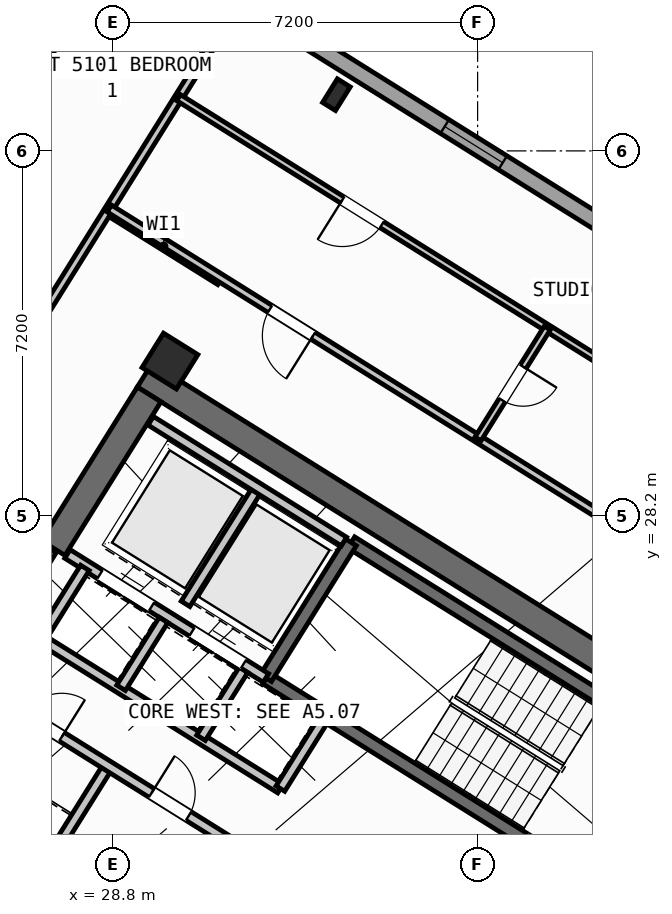
"""IFC4 building model, lengths in metres.
Left out: names, types, materials, properties, quantities, classifications, styles, units other than length and angle.
Written with IfcOpenShell. Run it as: python <this file> out.ifc"""

import sys

from ifc_helpers import new_model, si_unit, direction, frame, frame_2d, origin, origin_2d, place, context, subcontext, project, spatial, rectangle, hollow_rectangle, i_section, extrude, source, transform, mapped, element, fill, save


model = new_model("IFC4")
c1 = context("Model", 3, precision=1e-05, world=origin(), true_north=direction((0.0, 1.0)))
c2 = subcontext(c1, "Body", "Model", "MODEL_VIEW")
j1 = project(units=[si_unit("LENGTHUNIT", "METRE"), si_unit("PLANEANGLEUNIT", "RADIAN")], contexts=[c1])
p1 = place(None, origin())
s1 = spatial("IfcSite", under=j1, at=p1, CompositionType="ELEMENT")
p2 = place(p1, origin())
s2 = spatial("IfcBuilding", under=s1, at=p2, CompositionType="ELEMENT")
p3 = place(p2, frame((0.0, 0.0, 204.0)))
s3 = spatial("IfcBuildingStorey", under=s2, at=p3, CompositionType="ELEMENT", Elevation=204.0)
p4 = place(p3, frame((40.573, 24.01, 0.0), z_axis=(0.0, 0.0, 1.0), x_axis=(-0.848047359947, 0.529920442413, 0.0)))
e1 = element("IfcWall", 1, at=p4, inside=s3, PredefinedType="SHEAR", context=c2, shape_type="SweptSolid", body=[
    extrude(rectangle(XDim=13.14, YDim=0.55, at=frame_2d((6.57, 0.0))), origin(), (0.0, 0.0, 1.0), 3.35),
])
p5 = place(p3, frame((40.194, 23.922, 0.0), z_axis=(0.0, 0.0, 1.0), x_axis=(-0.529888438328, -0.848067357541, 0.0)))
e2 = element("IfcWall", 2, at=p5, inside=s3, PredefinedType="SHEAR", context=c2, shape_type="SweptSolid", body=[
    extrude(rectangle(XDim=3.575, YDim=0.55, at=frame_2d((1.788, 0.0))), origin(), (0.0, 0.0, 1.0), 3.35),
])
p6 = place(p3, frame((29.517, 30.594, 0.0), z_axis=(0.0, 0.0, 1.0), x_axis=(-0.529906864564, -0.848055844204, 0.0)))
e3 = element("IfcWall", 3, at=p6, inside=s3, PredefinedType="SHEAR", context=c2, shape_type="SweptSolid", body=[
    extrude(rectangle(XDim=3.575, YDim=0.55, at=frame_2d((1.788, 0.0))), origin(), (0.0, 0.0, 1.0), 3.35),
])
m1 = source(origin(), c2, "Body", "SweptSolid", [
    extrude(i_section(OverallWidth=0.3, OverallDepth=0.55, WebThickness=0.015, FlangeThickness=0.029, at=origin_2d()), origin(), (0.0, 0.0, 1.0), 3.6),
])
p7 = place(p3, frame((33.213, 36.509, 0.0), z_axis=(0.0, 0.0, 1.0), x_axis=(-0.848048096156, 0.529919264233, 0.0)))
e4 = element("IfcColumn", 4, at=p7, inside=s3, PredefinedType="COLUMN", context=c2, shape_type="MappedRepresentation", body=[
    mapped(m1, transform((0.0, 0.0, 0.0), scale=1.0)),
])
m2 = source(origin(), c2, "Body", "SweptSolid", [
    extrude(hollow_rectangle(XDim=0.8, YDim=0.8, WallThickness=0.032, at=origin_2d()), origin(), (0.0, 0.0, 1.0), 3.6),
])
p8 = place(p3, frame((29.928, 31.251, 0.0), z_axis=(0.0, 0.0, 1.0), x_axis=(-0.848048096156, 0.529919264233, 0.0)))
e5 = element("IfcColumn", 5, at=p8, inside=s3, PredefinedType="COLUMN", context=c2, shape_type="MappedRepresentation", body=[
    mapped(m2, transform((0.0, 0.0, 0.0), scale=1.0)),
])
p9 = place(p3, frame((31.76, 12.183, 0.0), z_axis=(0.0, 0.0, 1.0), x_axis=(-0.848047074256, 0.529920899612, 0.0)))
e6 = element("IfcWall", 6, at=p9, inside=s3, PredefinedType="STANDARD", context=c2, shape_type="SweptSolid", body=[
    extrude(rectangle(XDim=30.652, YDim=0.32, at=frame_2d((15.326, 0.0))), origin(), (0.0, 0.0, 1.0), 3.35),
])
p10 = place(p9, frame((15.166, 0.0, 0.0)))
e7 = element("IfcOpeningElement", 7, at=p10, cuts=e6, PredefinedType="OPENING", context=c2, shape_type="SweptSolid", body=[
    extrude(rectangle(XDim=1.2, YDim=2.15, at=frame_2d((0.6, 1.075))), frame((0.0, 0.17, 0.0), z_axis=(0.0, -1.0, 0.0), x_axis=(1.0, 0.0, 0.0)), (0.0, 0.0, 1.0), 0.34),
])
p11 = place(p9, frame((2.24, 0.0, 0.9)))
e8 = element("IfcOpeningElement", 8, at=p11, cuts=e6, PredefinedType="OPENING", context=c2, shape_type="SweptSolid", body=[
    extrude(rectangle(XDim=1.65, YDim=1.45, at=frame_2d((0.825, 0.725))), frame((0.0, 0.17, 0.0), z_axis=(0.0, -1.0, 0.0), x_axis=(1.0, 0.0, 0.0)), (0.0, 0.0, 1.0), 0.34),
])
p12 = place(p9, frame((7.469, 0.0, 0.9)))
e9 = element("IfcOpeningElement", 9, at=p12, cuts=e6, PredefinedType="OPENING", context=c2, shape_type="SweptSolid", body=[
    extrude(rectangle(XDim=1.65, YDim=1.45, at=frame_2d((0.825, 0.725))), frame((0.0, 0.17, 0.0), z_axis=(0.0, -1.0, 0.0), x_axis=(1.0, 0.0, 0.0)), (0.0, 0.0, 1.0), 0.34),
])
p13 = place(p9, frame((12.623, 0.0, 1.0)))
e10 = element("IfcOpeningElement", 10, at=p13, cuts=e6, PredefinedType="OPENING", context=c2, shape_type="SweptSolid", body=[
    extrude(rectangle(XDim=0.9, YDim=1.25, at=frame_2d((0.45, 0.625))), frame((0.0, 0.17, 0.0), z_axis=(0.0, -1.0, 0.0), x_axis=(1.0, 0.0, 0.0)), (0.0, 0.0, 1.0), 0.34),
])
p14 = place(p9, frame((19.556, 0.0, 1.0)))
e11 = element("IfcOpeningElement", 11, at=p14, cuts=e6, PredefinedType="OPENING", context=c2, shape_type="SweptSolid", body=[
    extrude(rectangle(XDim=0.9, YDim=1.25, at=frame_2d((0.45, 0.625))), frame((0.0, 0.17, 0.0), z_axis=(0.0, -1.0, 0.0), x_axis=(1.0, 0.0, 0.0)), (0.0, 0.0, 1.0), 0.34),
])
p15 = place(p9, frame((21.95, 0.0, 1.0)))
e12 = element("IfcOpeningElement", 12, at=p15, cuts=e6, PredefinedType="OPENING", context=c2, shape_type="SweptSolid", body=[
    extrude(rectangle(XDim=0.9, YDim=1.25, at=frame_2d((0.45, 0.625))), frame((0.0, 0.17, 0.0), z_axis=(0.0, -1.0, 0.0), x_axis=(1.0, 0.0, 0.0)), (0.0, 0.0, 1.0), 0.34),
])
p16 = place(p9, frame((26.983, 0.0, 0.9)))
e13 = element("IfcOpeningElement", 13, at=p16, cuts=e6, PredefinedType="OPENING", context=c2, shape_type="SweptSolid", body=[
    extrude(rectangle(XDim=1.35, YDim=1.45, at=frame_2d((0.675, 0.725))), frame((0.0, 0.17, 0.0), z_axis=(0.0, -1.0, 0.0), x_axis=(1.0, 0.0, 0.0)), (0.0, 0.0, 1.0), 0.34),
])
p17 = place(p3, frame((17.424, 47.083, 0.0), z_axis=(0.0, 0.0, 1.0), x_axis=(0.848049927979, -0.529916332693, 0.0)))
e14 = element("IfcWall", 14, at=p17, inside=s3, PredefinedType="STANDARD", context=c2, shape_type="SweptSolid", body=[
    extrude(rectangle(XDim=29.223, YDim=0.32, at=frame_2d((14.612, 0.0))), origin(), (0.0, 0.0, 1.0), 3.35),
])
p18 = place(p17, frame((8.799, 0.0, 0.0)))
e15 = element("IfcOpeningElement", 15, at=p18, cuts=e14, PredefinedType="OPENING", context=c2, shape_type="SweptSolid", body=[
    extrude(rectangle(XDim=1.05, YDim=2.15, at=frame_2d((0.525, 1.075))), frame((0.0, 0.17, 0.0), z_axis=(0.0, -1.0, 0.0), x_axis=(1.0, 0.0, 0.0)), (0.0, 0.0, 1.0), 0.34),
])
p19 = place(p17, frame((0.794, 0.0, 0.9)))
e16 = element("IfcOpeningElement", 16, at=p19, cuts=e14, PredefinedType="OPENING", context=c2, shape_type="SweptSolid", body=[
    extrude(rectangle(XDim=1.65, YDim=1.45, at=frame_2d((0.825, 0.725))), frame((0.0, 0.17, 0.0), z_axis=(0.0, -1.0, 0.0), x_axis=(1.0, 0.0, 0.0)), (0.0, 0.0, 1.0), 0.34),
])
p20 = place(p17, frame((4.056, 0.0, 0.9)))
e17 = element("IfcOpeningElement", 17, at=p20, cuts=e14, PredefinedType="OPENING", context=c2, shape_type="SweptSolid", body=[
    extrude(rectangle(XDim=1.35, YDim=1.45, at=frame_2d((0.675, 0.725))), frame((0.0, 0.17, 0.0), z_axis=(0.0, -1.0, 0.0), x_axis=(1.0, 0.0, 0.0)), (0.0, 0.0, 1.0), 0.34),
])
p21 = place(p17, frame((7.151, 0.0, 1.0)))
e18 = element("IfcOpeningElement", 18, at=p21, cuts=e14, PredefinedType="OPENING", context=c2, shape_type="SweptSolid", body=[
    extrude(rectangle(XDim=0.9, YDim=1.25, at=frame_2d((0.45, 0.625))), frame((0.0, 0.17, 0.0), z_axis=(0.0, -1.0, 0.0), x_axis=(1.0, 0.0, 0.0)), (0.0, 0.0, 1.0), 0.34),
])
p22 = place(p17, frame((14.612, 0.0, 1.0)))
e19 = element("IfcOpeningElement", 19, at=p22, cuts=e14, PredefinedType="OPENING", context=c2, shape_type="SweptSolid", body=[
    extrude(rectangle(XDim=0.9, YDim=1.25, at=frame_2d((0.45, 0.625))), frame((0.0, 0.17, 0.0), z_axis=(0.0, -1.0, 0.0), x_axis=(1.0, 0.0, 0.0)), (0.0, 0.0, 1.0), 0.34),
])
p23 = place(p17, frame((17.254, 0.0, 1.0)))
e20 = element("IfcOpeningElement", 20, at=p23, cuts=e14, PredefinedType="OPENING", context=c2, shape_type="SweptSolid", body=[
    extrude(rectangle(XDim=0.9, YDim=1.25, at=frame_2d((0.45, 0.625))), frame((0.0, 0.17, 0.0), z_axis=(0.0, -1.0, 0.0), x_axis=(1.0, 0.0, 0.0)), (0.0, 0.0, 1.0), 0.34),
])
p24 = place(p17, frame((21.139, 0.0, 0.9)))
e21 = element("IfcOpeningElement", 21, at=p24, cuts=e14, PredefinedType="OPENING", context=c2, shape_type="SweptSolid", body=[
    extrude(rectangle(XDim=1.35, YDim=1.45, at=frame_2d((0.675, 0.725))), frame((0.0, 0.17, 0.0), z_axis=(0.0, -1.0, 0.0), x_axis=(1.0, 0.0, 0.0)), (0.0, 0.0, 1.0), 0.34),
])
p25 = place(p17, frame((25.778, 0.0, 0.9)))
e22 = element("IfcOpeningElement", 22, at=p25, cuts=e14, PredefinedType="OPENING", context=c2, shape_type="SweptSolid", body=[
    extrude(rectangle(XDim=1.35, YDim=1.45, at=frame_2d((0.675, 0.725))), frame((0.0, 0.17, 0.0), z_axis=(0.0, -1.0, 0.0), x_axis=(1.0, 0.0, 0.0)), (0.0, 0.0, 1.0), 0.34),
])
p26 = place(p3, frame((31.28, 18.261, 0.0), z_axis=(0.0, 0.0, 1.0), x_axis=(-0.848051618787, 0.529913626805, 0.0)))
e23 = element("IfcWall", 23, at=p26, inside=s3, PredefinedType="SHEAR", context=c2, shape_type="SweptSolid", body=[
    extrude(rectangle(XDim=7.46, YDim=0.26, at=frame_2d((3.73, 0.0))), origin(), (0.0, 0.0, 1.0), 3.35),
])
p27 = place(p26, frame((0.36, 0.0, 0.0)))
e24 = element("IfcOpeningElement", 24, at=p27, cuts=e23, PredefinedType="OPENING", context=c2, shape_type="SweptSolid", body=[
    extrude(rectangle(XDim=0.86, YDim=2.05, at=frame_2d((0.43, 1.025))), frame((0.0, 0.14, 0.0), z_axis=(0.0, -1.0, 0.0), x_axis=(1.0, 0.0, 0.0)), (0.0, 0.0, 1.0), 0.28),
])
p28 = place(p3, frame((39.721, 23.788, 0.0), z_axis=(0.0, 0.0, 1.0), x_axis=(-0.848054434086, 0.529909121291, 0.0)))
e25 = element("IfcWall", 25, at=p28, inside=s3, PredefinedType="SHEAR", context=c2, shape_type="SweptSolid", body=[
    extrude(rectangle(XDim=7.33, YDim=0.26, at=frame_2d((3.665, 0.0))), origin(), (0.0, 0.0, 1.0), 3.35),
])
p29 = place(p3, frame((38.046, 21.108, 0.0), z_axis=(0.0, 0.0, 1.0), x_axis=(-0.848054434086, 0.529909121291, 0.0)))
e26 = element("IfcWall", 26, at=p29, inside=s3, PredefinedType="SHEAR", context=c2, shape_type="SweptSolid", body=[
    extrude(rectangle(XDim=7.33, YDim=0.26, at=frame_2d((3.665, 0.0))), origin(), (0.0, 0.0, 1.0), 3.35),
])
p30 = place(p29, frame((0.22, 0.0, 0.0)))
e27 = element("IfcOpeningElement", 27, at=p30, cuts=e26, PredefinedType="OPENING", context=c2, shape_type="SweptSolid", body=[
    extrude(rectangle(XDim=1.1, YDim=2.1, at=frame_2d((0.55, 1.05))), frame((0.0, 0.14, 0.0), z_axis=(0.0, -1.0, 0.0), x_axis=(1.0, 0.0, 0.0)), (0.0, 0.0, 1.0), 0.28),
])
p31 = place(p3, frame((33.496, 27.677, 0.0), z_axis=(0.0, 0.0, 1.0), x_axis=(-0.529908658664, -0.84805472316, 0.0)))
e28 = element("IfcWall", 28, at=p31, inside=s3, PredefinedType="SHEAR", context=c2, shape_type="SweptSolid", body=[
    extrude(rectangle(XDim=3.16, YDim=0.26, at=frame_2d((1.58, 0.0))), origin(), (0.0, 0.0, 1.0), 3.35),
])
p32 = place(p3, frame((31.822, 24.998, 0.0), z_axis=(0.0, 0.0, 1.0), x_axis=(-0.848036912365, 0.52993716162, 0.0)))
e29 = element("IfcWall", 29, at=p32, inside=s3, PredefinedType="STANDARD", context=c2, shape_type="SweptSolid", body=[
    extrude(rectangle(XDim=4.618, YDim=0.2, at=frame_2d((2.309, 0.0))), origin(), (0.0, 0.0, 1.0), 3.34),
])
p33 = place(p32, frame((0.52, 0.0, 0.0)))
e30 = element("IfcOpeningElement", 30, at=p33, cuts=e29, PredefinedType="OPENING", context=c2, shape_type="SweptSolid", body=[
    extrude(rectangle(XDim=1.2, YDim=2.15, at=frame_2d((0.6, 1.075))), frame((0.0, 0.11, 0.0), z_axis=(0.0, -1.0, 0.0), x_axis=(1.0, 0.0, 0.0)), (0.0, 0.0, 1.0), 0.22),
])
p34 = place(p32, frame((2.66, 0.0, 0.0)))
e31 = element("IfcOpeningElement", 31, at=p34, cuts=e29, PredefinedType="OPENING", context=c2, shape_type="SweptSolid", body=[
    extrude(rectangle(XDim=1.2, YDim=2.15, at=frame_2d((0.6, 1.075))), frame((0.0, 0.11, 0.0), z_axis=(0.0, -1.0, 0.0), x_axis=(1.0, 0.0, 0.0)), (0.0, 0.0, 1.0), 0.22),
])
p35 = place(p3, frame((32.108, 22.814, 0.0), z_axis=(0.0, 0.0, 1.0), x_axis=(-0.848042229521, 0.529928652696, 0.0)))
e32 = element("IfcWall", 32, at=p35, inside=s3, PredefinedType="STANDARD", context=c2, shape_type="SweptSolid", body=[
    extrude(rectangle(XDim=5.62, YDim=0.2, at=frame_2d((2.81, 0.0))), origin(), (0.0, 0.0, 1.0), 3.34),
])
p36 = place(p3, frame((32.982, 24.213, 0.0), z_axis=(0.0, 0.0, 1.0), x_axis=(-0.529839334948, -0.84809803628, 0.0)))
e33 = element("IfcWall", 33, at=p36, inside=s3, PredefinedType="STANDARD", context=c2, shape_type="SweptSolid", body=[
    extrude(rectangle(XDim=1.65, YDim=0.2, at=frame_2d((0.825, 0.0))), origin(), (0.0, 0.0, 1.0), 3.34),
])
p37 = place(p3, frame((28.25, 27.17, 0.0), z_axis=(0.0, 0.0, 1.0), x_axis=(-0.529905827651, -0.848056492117, 0.0)))
e34 = element("IfcWall", 34, at=p37, inside=s3, PredefinedType="STANDARD", context=c2, shape_type="SweptSolid", body=[
    extrude(rectangle(XDim=1.65, YDim=0.2, at=frame_2d((0.825, 0.0))), origin(), (0.0, 0.0, 1.0), 3.34),
])
p38 = place(p3, frame((31.645, 28.716, 0.0), z_axis=(0.0, 0.0, 1.0), x_axis=(-0.52986693015, -0.848080795876, 0.0)))
e35 = element("IfcWall", 35, at=p38, inside=s3, PredefinedType="STANDARD", context=c2, shape_type="SweptSolid", body=[
    extrude(rectangle(XDim=2.66, YDim=0.2, at=frame_2d((1.33, 0.0))), origin(), (0.0, 0.0, 1.0), 3.34),
])
p39 = place(p3, frame((33.363, 27.69, 0.0), z_axis=(0.0, 0.0, 1.0), x_axis=(-0.848047090064, 0.529920874315, 0.0)))
e36 = element("IfcWall", 36, at=p39, inside=s3, PredefinedType="STANDARD", context=c2, shape_type="SweptSolid", body=[
    extrude(rectangle(XDim=4.498, YDim=0.2, at=frame_2d((2.249, 0.0))), origin(), (0.0, 0.0, 1.0), 3.34),
])
for number, where, z_axis, x_axis in (
    (37, (31.379, 25.156, 0.0), (0.0, 0.0, 1.0), (-0.53, -0.848, 0.0)),
    (38, (29.801, 26.142, 0.0), (0.0, 0.0, 1.0), (-0.53, -0.848, 0.0)),
):
    element("IfcWall", number, at=place(p3, frame(where, z_axis=z_axis, x_axis=x_axis)), inside=s3, PredefinedType="STANDARD", context=c2, shape_type="SweptSolid", body=[
        extrude(rectangle(XDim=1.58, YDim=0.2, at=frame_2d((0.79, 0.0))), origin(), (0.0, 0.0, 1.0), 3.34),
    ])
p40 = place(p3, frame((28.71, 23.263, 0.0), z_axis=(0.0, 0.0, 1.0), x_axis=(-0.529907497854, -0.848055448493, 0.0)))
e39 = element("IfcWall", 39, at=p40, inside=s3, PredefinedType="STANDARD", context=c2, shape_type="SweptSolid", body=[
    extrude(rectangle(XDim=2.88, YDim=0.2, at=frame_2d((1.44, 0.0))), origin(), (0.0, 0.0, 1.0), 3.34),
])
p41 = place(p3, frame((31.525, 21.504, 0.0), z_axis=(0.0, 0.0, 1.0), x_axis=(-0.848040211232, 0.529931882541, 0.0)))
e40 = element("IfcWall", 40, at=p41, inside=s3, PredefinedType="STANDARD", context=c2, shape_type="SweptSolid", body=[
    extrude(rectangle(XDim=6.218, YDim=0.2, at=frame_2d((3.109, 0.0))), origin(), (0.0, 0.0, 1.0), 3.34),
])
p42 = place(p41, frame((4.4, 0.0, 0.0)))
e41 = element("IfcOpeningElement", 41, at=p42, cuts=e40, PredefinedType="OPENING", context=c2, shape_type="SweptSolid", body=[
    extrude(rectangle(XDim=0.86, YDim=2.05, at=frame_2d((0.43, 1.025))), frame((0.0, 0.11, 0.0), z_axis=(0.0, -1.0, 0.0), x_axis=(1.0, 0.0, 0.0)), (0.0, 0.0, 1.0), 0.22),
])
p43 = place(p41, frame((1.45, 0.0, 0.0)))
e42 = element("IfcOpeningElement", 42, at=p43, cuts=e40, PredefinedType="OPENING", context=c2, shape_type="SweptSolid", body=[
    extrude(rectangle(XDim=0.86, YDim=2.05, at=frame_2d((0.43, 1.025))), frame((0.0, 0.11, 0.0), z_axis=(0.0, -1.0, 0.0), x_axis=(1.0, 0.0, 0.0)), (0.0, 0.0, 1.0), 0.22),
])
p44 = place(p3, frame((27.596, 27.52, 0.0), z_axis=(0.0, 0.0, 1.0), x_axis=(-0.529865479138, -0.848081702443, 0.0)))
e43 = element("IfcWall", 43, at=p44, inside=s3, PredefinedType="STANDARD", context=c2, shape_type="SweptSolid", body=[
    extrude(rectangle(XDim=2.96, YDim=0.2, at=frame_2d((1.48, 0.0))), origin(), (0.0, 0.0, 1.0), 3.34),
])
p45 = place(p44, frame((1.76, 0.0, 0.0)))
e44 = element("IfcOpeningElement", 44, at=p45, cuts=e43, PredefinedType="OPENING", context=c2, shape_type="SweptSolid", body=[
    extrude(rectangle(XDim=0.86, YDim=2.05, at=frame_2d((0.43, 1.025))), frame((0.0, 0.11, 0.0), z_axis=(0.0, -1.0, 0.0), x_axis=(1.0, 0.0, 0.0)), (0.0, 0.0, 1.0), 0.22),
])
p46 = place(p3, frame((30.914, 32.829, 0.0), z_axis=(0.0, 0.0, 1.0), x_axis=(-0.848008813643, 0.529982124211, 0.0)))
e45 = element("IfcWall", 45, at=p46, inside=s3, PredefinedType="PARTITIONING", context=c2, shape_type="SweptSolid", body=[
    extrude(rectangle(XDim=2.61, YDim=0.16, at=frame_2d((1.305, 0.0))), origin(), (0.0, 0.0, 1.0), 3.34),
])
p47 = place(p3, frame((31.239, 38.274, 0.0), z_axis=(0.0, 0.0, 1.0), x_axis=(-0.529918119251, -0.84804881162, 0.0)))
e46 = element("IfcWall", 46, at=p47, inside=s3, PredefinedType="PARTITIONING", context=c2, shape_type="SweptSolid", body=[
    extrude(rectangle(XDim=17.65, YDim=0.16, at=frame_2d((8.825, 0.0))), origin(), (0.0, 0.0, 1.0), 3.34),
])
p48 = place(p3, frame((29.161, 39.89, 0.0), z_axis=(0.0, 0.0, 1.0), x_axis=(-0.529915512424, -0.848050440535, 0.0)))
e47 = element("IfcWall", 47, at=p48, inside=s3, PredefinedType="PARTITIONING", context=c2, shape_type="SweptSolid", body=[
    extrude(rectangle(XDim=15.52, YDim=0.11, at=frame_2d((7.76, 0.0))), origin(), (0.0, 0.0, 1.0), 3.34),
])
p49 = place(p48, frame((7.345, 0.0, 0.0)))
e48 = element("IfcOpeningElement", 48, at=p49, cuts=e47, PredefinedType="OPENING", context=c2, shape_type="SweptSolid", body=[
    extrude(rectangle(XDim=0.92, YDim=2.08, at=frame_2d((0.46, 1.04))), frame((0.0, 0.065, 0.0), z_axis=(0.0, -1.0, 0.0), x_axis=(1.0, 0.0, 0.0)), (0.0, 0.0, 1.0), 0.13),
])
p50 = place(p3, frame((41.936, 26.012, 0.0), z_axis=(0.0, 0.0, 1.0), x_axis=(-0.848051154596, 0.529914369676, 0.0)))
e49 = element("IfcWall", 49, at=p50, inside=s3, PredefinedType="PARTITIONING", context=c2, shape_type="SweptSolid", body=[
    extrude(rectangle(XDim=15.57, YDim=0.16, at=frame_2d((7.785, 0.0))), origin(), (0.0, 0.0, 1.0), 3.34),
])
p51 = place(p50, frame((10.83, 0.0, 0.0)))
e50 = element("IfcOpeningElement", 50, at=p51, cuts=e49, PredefinedType="OPENING", context=c2, shape_type="SweptSolid", body=[
    extrude(rectangle(XDim=1.0, YDim=2.1, at=frame_2d((0.5, 1.05))), frame((0.0, 0.09, 0.0), z_axis=(0.0, -1.0, 0.0), x_axis=(1.0, 0.0, 0.0)), (0.0, 0.0, 1.0), 0.18),
])
p52 = place(p3, frame((42.226, 28.873, 0.0), z_axis=(0.0, 0.0, 1.0), x_axis=(-0.848049134363, 0.529917602752, 0.0)))
e51 = element("IfcWall", 51, at=p52, inside=s3, PredefinedType="PLUMBINGWALL", context=c2, shape_type="SweptSolid", body=[
    extrude(rectangle(XDim=14.3, YDim=0.14, at=frame_2d((7.15, 0.0))), origin(), (0.0, 0.0, 1.0), 3.34),
])
p53 = place(p52, frame((9.57, 0.0, 0.0)))
e52 = element("IfcOpeningElement", 52, at=p53, cuts=e51, PredefinedType="OPENING", context=c2, shape_type="SweptSolid", body=[
    extrude(rectangle(XDim=0.92, YDim=2.08, at=frame_2d((0.46, 1.04))), frame((0.0, 0.08, 0.0), z_axis=(0.0, -1.0, 0.0), x_axis=(1.0, 0.0, 0.0)), (0.0, 0.0, 1.0), 0.16),
])
p54 = place(p3, frame((37.375, 31.904, 0.0), z_axis=(0.0, 0.0, 1.0), x_axis=(-0.529913878929, -0.848051461244, 0.0)))
e53 = element("IfcWall", 53, at=p54, inside=s3, PredefinedType="PLUMBINGWALL", context=c2, shape_type="SweptSolid", body=[
    extrude(rectangle(XDim=2.58, YDim=0.14, at=frame_2d((1.29, 0.0))), origin(), (0.0, 0.0, 1.0), 3.34),
])
p55 = place(p54, frame((0.9, 0.0, 0.0)))
e54 = element("IfcOpeningElement", 54, at=p55, cuts=e53, PredefinedType="OPENING", context=c2, shape_type="SweptSolid", body=[
    extrude(rectangle(XDim=0.78, YDim=2.05, at=frame_2d((0.39, 1.025))), frame((0.0, 0.08, 0.0), z_axis=(0.0, -1.0, 0.0), x_axis=(1.0, 0.0, 0.0)), (0.0, 0.0, 1.0), 0.16),
])
m3 = source(origin(), c2, "Body", "SweptSolid", [
    extrude(rectangle(XDim=1.35, YDim=1.45, at=frame_2d((0.675, 0.725))), frame((0.0, 0.03, 0.0), z_axis=(0.0, -1.0, 0.0), x_axis=(1.0, 0.0, 0.0)), (0.0, 0.0, 1.0), 0.06),
])
p56 = place(p24, origin())
e55 = element("IfcWindow", 55, at=p56, inside=s3, PartitioningType="SINGLE_PANEL", PredefinedType="WINDOW", context=c2, shape_type="MappedRepresentation", body=[
    mapped(m3, transform((0.0, 0.0, 0.0), scale=1.0)),
])
fill(e21, e55)
m4 = source(origin(), c2, "Body", "SweptSolid", [
    extrude(rectangle(XDim=1.2, YDim=2.15, at=frame_2d((0.6, 1.075))), frame((0.0, 0.025, 0.0), z_axis=(0.0, -1.0, 0.0), x_axis=(1.0, 0.0, 0.0)), (0.0, 0.0, 1.0), 0.05),
])
p57 = place(p33, origin())
e56 = element("IfcDoor", 56, at=p57, inside=s3, OperationType="DOUBLE_DOOR_SLIDING", PredefinedType="DOOR", context=c2, shape_type="MappedRepresentation", body=[
    mapped(m4, transform((0.0, 0.0, 0.0), scale=1.0)),
])
fill(e30, e56)
p58 = place(p34, origin())
e57 = element("IfcDoor", 57, at=p58, inside=s3, OperationType="DOUBLE_DOOR_SLIDING", PredefinedType="DOOR", context=c2, shape_type="MappedRepresentation", body=[
    mapped(m4, transform((0.0, 0.0, 0.0), scale=1.0)),
])
fill(e31, e57)
m5 = source(origin(), c2, "Body", "SweptSolid", [
    extrude(rectangle(XDim=0.86, YDim=2.05, at=frame_2d((0.43, 1.025))), frame((0.0, 0.025, 0.0), z_axis=(0.0, -1.0, 0.0), x_axis=(1.0, 0.0, 0.0)), (0.0, 0.0, 1.0), 0.05),
])
p59 = place(p42, frame((0.86, 0.0, 0.0), z_axis=(0.0, 0.0, 1.0), x_axis=(-1.0, 0.0, 0.0)))
e58 = element("IfcDoor", 58, at=p59, inside=s3, OperationType="SINGLE_SWING_RIGHT", PredefinedType="DOOR", context=c2, shape_type="MappedRepresentation", body=[
    mapped(m5, transform((0.0, 0.0, 0.0), scale=1.0)),
])
fill(e41, e58)
p60 = place(p43, frame((0.86, 0.0, 0.0), z_axis=(0.0, 0.0, 1.0), x_axis=(-1.0, 0.0, 0.0)))
e59 = element("IfcDoor", 59, at=p60, inside=s3, OperationType="SINGLE_SWING_LEFT", PredefinedType="DOOR", context=c2, shape_type="MappedRepresentation", body=[
    mapped(m5, transform((0.0, 0.0, 0.0), scale=1.0)),
])
fill(e42, e59)
m6 = source(origin(), c2, "Body", "SweptSolid", [
    extrude(rectangle(XDim=1.0, YDim=2.1, at=frame_2d((0.5, 1.05))), frame((0.0, 0.025, 0.0), z_axis=(0.0, -1.0, 0.0), x_axis=(1.0, 0.0, 0.0)), (0.0, 0.0, 1.0), 0.05),
])
p61 = place(p51, origin())
e60 = element("IfcDoor", 60, at=p61, inside=s3, OperationType="SINGLE_SWING_LEFT", PredefinedType="DOOR", context=c2, shape_type="MappedRepresentation", body=[
    mapped(m6, transform((0.0, 0.0, 0.0), scale=1.0)),
])
fill(e50, e60)
m7 = source(origin(), c2, "Body", "SweptSolid", [
    extrude(rectangle(XDim=0.92, YDim=2.08, at=frame_2d((0.46, 1.04))), frame((0.0, 0.025, 0.0), z_axis=(0.0, -1.0, 0.0), x_axis=(1.0, 0.0, 0.0)), (0.0, 0.0, 1.0), 0.05),
])
p62 = place(p53, origin())
e61 = element("IfcDoor", 61, at=p62, inside=s3, OperationType="SINGLE_SWING_RIGHT", PredefinedType="DOOR", context=c2, shape_type="MappedRepresentation", body=[
    mapped(m7, transform((0.0, 0.0, 0.0), scale=1.0)),
])
fill(e52, e61)
m8 = source(origin(), c2, "Body", "SweptSolid", [
    extrude(rectangle(XDim=0.78, YDim=2.05, at=frame_2d((0.39, 1.025))), frame((0.0, 0.025, 0.0), z_axis=(0.0, -1.0, 0.0), x_axis=(1.0, 0.0, 0.0)), (0.0, 0.0, 1.0), 0.05),
])
p63 = place(p55, origin())
e62 = element("IfcDoor", 62, at=p63, inside=s3, OperationType="SINGLE_SWING_LEFT", PredefinedType="DOOR", context=c2, shape_type="MappedRepresentation", body=[
    mapped(m8, transform((0.0, 0.0, 0.0), scale=1.0)),
])
fill(e54, e62)
save(model, sys.argv[1])
